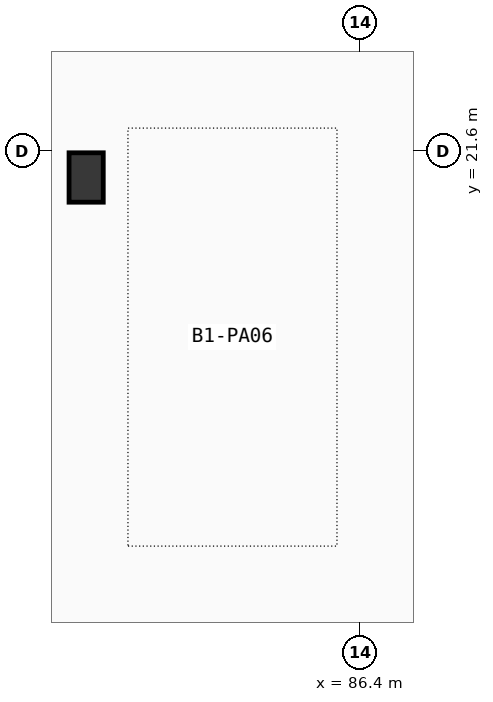
"""IFC4 building model, lengths in metres.
Left out: names, types, materials, properties, quantities, classifications, styles, units other than length and angle.
Written with IfcOpenShell. Run it as: python <this file> out.ifc"""

import sys

from ifc_helpers import new_model, si_unit, direction, frame, origin, origin_2d, place, context, subcontext, project, spatial, rectangle, extrude, element, save


model = new_model("IFC4")
c1 = context("Model", 3, precision=1e-05, world=origin(), true_north=direction((0.0, 1.0)))
c2 = subcontext(c1, "Body", "Model", "MODEL_VIEW")
j1 = project(units=[si_unit("LENGTHUNIT", "METRE"), si_unit("PLANEANGLEUNIT", "RADIAN")], contexts=[c1])
p1 = place(None, origin())
s1 = spatial("IfcSite", under=j1, at=p1, CompositionType="ELEMENT")
p2 = place(p1, origin())
s2 = spatial("IfcBuilding", under=s1, at=p2, CompositionType="ELEMENT")
p3 = place(p2, frame((0.0, 0.0, -4.2)))
s3 = spatial("IfcBuildingStorey", under=s2, at=p3, CompositionType="ELEMENT", Elevation=-4.2)
p4 = place(p3, frame((82.8, 21.25, 0.0), z_axis=(0.0, 0.0, 1.0), x_axis=(1.0, 0.0, 0.0)))
e1 = element("IfcColumn", 1, at=p4, inside=s3, PredefinedType="PILASTER", context=c2, shape_type="SweptSolid", body=[
    extrude(rectangle(XDim=0.45, YDim=0.65, at=origin_2d()), origin(), (0.0, 0.0, 1.0), 4.2),
])
save(model, sys.argv[1])
